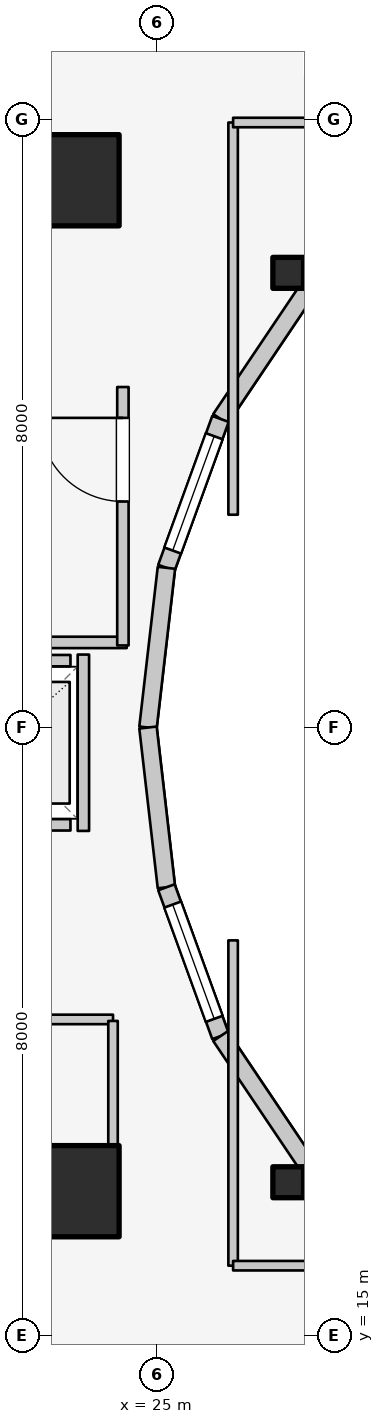
"""IFC4 building model, lengths in metres.
Left out: names, types, materials, properties, quantities, classifications, styles, units other than length and angle.
Written with IfcOpenShell. Run it as: python <this file> out.ifc"""

import sys

from ifc_helpers import new_model, si_unit, direction, frame, frame_2d, origin, origin_2d, place, context, subcontext, project, spatial, rectangle, i_section, extrude, element, fill, save


model = new_model("IFC4")
c1 = context("Model", 3, precision=1e-05, world=origin(), true_north=direction((0.0, 1.0)))
c2 = subcontext(c1, "Body", "Model", "MODEL_VIEW")
j1 = project(units=[si_unit("LENGTHUNIT", "METRE"), si_unit("PLANEANGLEUNIT", "RADIAN")], contexts=[c1])
p1 = place(None, origin())
s1 = spatial("IfcSite", under=j1, at=p1, CompositionType="ELEMENT")
p2 = place(p1, origin())
s2 = spatial("IfcBuilding", under=s1, at=p2, CompositionType="ELEMENT")
p3 = place(p2, frame((0.0, 0.0, 256.8)))
s3 = spatial("IfcBuildingStorey", under=s2, at=p3, CompositionType="ELEMENT", Elevation=256.8)
for number, where, z_axis, x_axis in (
    (1, (19.65, 16.55, 0.0), (0.0, 0.0, 1.0), (1.0, 0.0, 0.0)),
    (2, (19.65, 30.35, 0.0), (0.0, 0.0, 1.0), (1.0, 0.0, 0.0)),
):
    element("IfcWall", number, at=place(p3, frame(where, z_axis=z_axis, x_axis=x_axis)), inside=s3, PredefinedType="SHEAR", context=c2, shape_type="SweptSolid", body=[
        extrude(rectangle(XDim=4.5, YDim=0.45, at=frame_2d((2.25, 0.0))), origin(), (0.0, 0.0, 1.0), 3.6),
    ])
for number, where, z_axis, x_axis in (
    (3, (23.9, 16.9, 0.0), (0.0, 0.0, 1.0), (1.0, 0.0, 0.0)),
    (4, (23.9, 30.2, 0.0), (0.0, 0.0, 1.0), (1.0, 0.0, 0.0)),
):
    element("IfcColumn", number, at=place(p3, frame(where, z_axis=z_axis, x_axis=x_axis)), inside=s3, PredefinedType="COLUMN", context=c2, shape_type="SweptSolid", body=[
        extrude(rectangle(XDim=1.2, YDim=1.2, at=origin_2d()), origin(), (0.0, 0.0, 1.0), 3.6),
    ])
for number, where, z_axis, x_axis in (
    (5, (26.725, 28.982, 0.0), (0.0, 0.0, 1.0), (1.0, 0.0, 0.0)),
    (6, (26.725, 17.018, 0.0), (0.0, 0.0, 1.0), (1.0, 0.0, 0.0)),
):
    element("IfcColumn", number, at=place(p3, frame(where, z_axis=z_axis, x_axis=x_axis)), inside=s3, PredefinedType="COLUMN", context=c2, shape_type="SweptSolid", body=[
        extrude(i_section(OverallWidth=0.404, OverallDepth=0.407, WebThickness=0.027, FlangeThickness=0.044, FilletRadius=0.025, at=origin_2d()), origin(), (0.0, 0.0, 1.0), 3.6),
    ])
p4 = place(p3, frame((28.44, 30.032, 0.0), z_axis=(0.0, 0.0, 1.0), x_axis=(-0.752576694707, -0.658504607869, 0.0)))
e7 = element("IfcWall", 7, at=p4, inside=s3, PredefinedType="STANDARD", context=c2, shape_type="SweptSolid", body=[
    extrude(rectangle(XDim=1.959, YDim=0.23, at=frame_2d((0.98, 0.0))), origin(), (0.0, 0.0, 1.0), 1.72),
])
p5 = place(p3, frame((26.965, 28.742, 0.0), z_axis=(0.0, 0.0, 1.0), x_axis=(-0.558197800898, -0.829707909492, 0.0)))
e8 = element("IfcWall", 8, at=p5, inside=s3, PredefinedType="STANDARD", context=c2, shape_type="SweptSolid", body=[
    extrude(rectangle(XDim=2.027, YDim=0.23, at=frame_2d((1.013, 0.0))), origin(), (0.0, 0.0, 1.0), 1.72),
])
p6 = place(p3, frame((25.834, 27.06, 0.0), z_axis=(0.0, 0.0, 1.0), x_axis=(-0.341423187295, -0.93990968033, 0.0)))
e9 = element("IfcWall", 9, at=p6, inside=s3, PredefinedType="STANDARD", context=c2, shape_type="SweptSolid", body=[
    extrude(rectangle(XDim=2.084, YDim=0.23, at=frame_2d((1.042, 0.0))), origin(), (0.0, 0.0, 1.0), 3.06),
])
p7 = place(p6, frame((0.242, 0.0, 0.85)))
e10 = element("IfcOpeningElement", 10, at=p7, cuts=e9, PredefinedType="OPENING", context=c2, shape_type="SweptSolid", body=[
    extrude(rectangle(XDim=1.6, YDim=1.65, at=frame_2d((0.8, 0.825))), frame((0.0, 0.125, 0.0), z_axis=(0.0, -1.0, 0.0), x_axis=(1.0, 0.0, 0.0)), (0.0, 0.0, 1.0), 0.25),
])
for number, where, z_axis, x_axis in (
    (11, (25.123, 25.102, 0.0), (0.0, 0.0, 1.0), (-0.115, -0.993, 0.0)),
    (12, (24.88, 23.0, 0.0), (0.0, 0.0, 1.0), (0.115, -0.993, 0.0)),
):
    element("IfcWall", number, at=place(p3, frame(where, z_axis=z_axis, x_axis=x_axis)), inside=s3, PredefinedType="STANDARD", context=c2, shape_type="SweptSolid", body=[
        extrude(rectangle(XDim=2.115, YDim=0.23, at=frame_2d((1.058, 0.0))), origin(), (0.0, 0.0, 1.0), 3.06),
    ])
p8 = place(p3, frame((25.123, 20.898, 0.0), z_axis=(0.0, 0.0, 1.0), x_axis=(0.341423187295, -0.93990968033, 0.0)))
e13 = element("IfcWall", 13, at=p8, inside=s3, PredefinedType="STANDARD", context=c2, shape_type="SweptSolid", body=[
    extrude(rectangle(XDim=2.084, YDim=0.23, at=frame_2d((1.042, 0.0))), origin(), (0.0, 0.0, 1.0), 3.06),
])
p9 = place(p8, frame((0.242, 0.0, 0.85)))
e14 = element("IfcOpeningElement", 14, at=p9, cuts=e13, PredefinedType="OPENING", context=c2, shape_type="SweptSolid", body=[
    extrude(rectangle(XDim=1.6, YDim=1.65, at=frame_2d((0.8, 0.825))), frame((0.0, 0.125, 0.0), z_axis=(0.0, -1.0, 0.0), x_axis=(1.0, 0.0, 0.0)), (0.0, 0.0, 1.0), 0.25),
])
p10 = place(p3, frame((25.834, 18.94, 0.0), z_axis=(0.0, 0.0, 1.0), x_axis=(0.558197800898, -0.829707909492, 0.0)))
e15 = element("IfcWall", 15, at=p10, inside=s3, PredefinedType="STANDARD", context=c2, shape_type="SweptSolid", body=[
    extrude(rectangle(XDim=2.027, YDim=0.23, at=frame_2d((1.013, 0.0))), origin(), (0.0, 0.0, 1.0), 1.72),
])
p11 = place(p3, frame((26.965, 17.258, 0.0), z_axis=(0.0, 0.0, 1.0), x_axis=(0.752576694707, -0.658504607869, 0.0)))
e16 = element("IfcWall", 16, at=p11, inside=s3, PredefinedType="STANDARD", context=c2, shape_type="SweptSolid", body=[
    extrude(rectangle(XDim=1.959, YDim=0.23, at=frame_2d((0.98, 0.0))), origin(), (0.0, 0.0, 1.0), 1.72),
])
p12 = place(p3, frame((22.04, 21.72, 0.0), z_axis=(0.0, 0.0, 1.0), x_axis=(1.0, 0.0, 0.0)))
e17 = element("IfcWall", 17, at=p12, inside=s3, PredefinedType="SOLIDWALL", context=c2, shape_type="SweptSolid", body=[
    extrude(rectangle(XDim=1.82, YDim=0.15, at=frame_2d((0.91, 0.0))), origin(), (0.0, 0.0, 1.0), 2.62),
])
p13 = place(p12, frame((0.36, 0.0, 0.0)))
e18 = element("IfcOpeningElement", 18, at=p13, cuts=e17, PredefinedType="OPENING", context=c2, shape_type="SweptSolid", body=[
    extrude(rectangle(XDim=1.1, YDim=2.1, at=frame_2d((0.55, 1.05))), frame((0.0, 0.085, 0.0), z_axis=(0.0, -1.0, 0.0), x_axis=(1.0, 0.0, 0.0)), (0.0, 0.0, 1.0), 0.17),
])
p14 = place(p3, frame((22.04, 23.88, 0.0), z_axis=(0.0, 0.0, 1.0), x_axis=(1.0, 0.0, 0.0)))
e19 = element("IfcWall", 19, at=p14, inside=s3, PredefinedType="SOLIDWALL", context=c2, shape_type="SweptSolid", body=[
    extrude(rectangle(XDim=1.82, YDim=0.15, at=frame_2d((0.91, 0.0))), origin(), (0.0, 0.0, 1.0), 2.62),
])
p15 = place(p3, frame((24.03, 21.64, 0.0), z_axis=(0.0, 0.0, 1.0), x_axis=(0.0, 1.0, 0.0)))
e20 = element("IfcWall", 20, at=p15, inside=s3, PredefinedType="SOLIDWALL", context=c2, shape_type="SweptSolid", body=[
    extrude(rectangle(XDim=2.32, YDim=0.15, at=frame_2d((1.16, 0.0))), origin(), (0.0, 0.0, 1.0), 2.62),
])
p16 = place(p3, frame((19.52, 24.12, 0.0), z_axis=(0.0, 0.0, 1.0), x_axis=(1.0, 0.0, 0.0)))
e21 = element("IfcWall", 21, at=p16, inside=s3, PredefinedType="PARTITIONING", context=c2, shape_type="SweptSolid", body=[
    extrude(rectangle(XDim=5.08, YDim=0.15, at=frame_2d((2.54, 0.0))), origin(), (0.0, 0.0, 1.0), 2.62),
])
p17 = place(p3, frame((24.55, 24.08, 0.0), z_axis=(0.0, 0.0, 1.0), x_axis=(0.0, 1.0, 0.0)))
e22 = element("IfcWall", 22, at=p17, inside=s3, PredefinedType="PARTITIONING", context=c2, shape_type="SweptSolid", body=[
    extrude(rectangle(XDim=3.4, YDim=0.15, at=frame_2d((1.7, 0.0))), origin(), (0.0, 0.0, 1.0), 3.075),
])
p18 = place(p17, frame((1.894, 0.0, 0.0)))
e23 = element("IfcOpeningElement", 23, at=p18, cuts=e22, PredefinedType="OPENING", context=c2, shape_type="SweptSolid", body=[
    extrude(rectangle(XDim=1.1, YDim=2.1, at=frame_2d((0.55, 1.05))), frame((0.0, 0.085, 0.0), z_axis=(0.0, -1.0, 0.0), x_axis=(1.0, 0.0, 0.0)), (0.0, 0.0, 1.0), 0.17),
])
p19 = place(p3, frame((19.55, 19.16, 0.0), z_axis=(0.0, 0.0, 1.0), x_axis=(1.0, 0.0, 0.0)))
e24 = element("IfcWall", 24, at=p19, inside=s3, PredefinedType="PARTITIONING", context=c2, shape_type="SweptSolid", body=[
    extrude(rectangle(XDim=4.87, YDim=0.125, at=frame_2d((2.435, 0.0))), origin(), (0.0, 0.0, 1.0), 2.62),
])
p20 = place(p19, frame((2.272, 0.0, 0.0)))
e25 = element("IfcOpeningElement", 25, at=p20, cuts=e24, PredefinedType="OPENING", context=c2, shape_type="SweptSolid", body=[
    extrude(rectangle(XDim=0.85, YDim=2.05, at=frame_2d((0.425, 1.025))), frame((0.0, 0.073, 0.0), z_axis=(0.0, -1.0, 0.0), x_axis=(1.0, 0.0, 0.0)), (0.0, 0.0, 1.0), 0.145),
])
p21 = place(p3, frame((24.42, 17.1, 0.0), z_axis=(0.0, 0.0, 1.0), x_axis=(0.0, 1.0, 0.0)))
e26 = element("IfcWall", 26, at=p21, inside=s3, PredefinedType="PARTITIONING", context=c2, shape_type="SweptSolid", body=[
    extrude(rectangle(XDim=2.04, YDim=0.125, at=frame_2d((1.02, 0.0))), origin(), (0.0, 0.0, 1.0), 2.452),
])
p22 = place(p3, frame((28.45, 30.015, 0.0), z_axis=(0.0, 0.0, 1.0), x_axis=(-0.522763432117, 0.852477796802, 0.0)))
e27 = element("IfcWall", 27, at=p22, inside=s3, PredefinedType="PARTITIONING", context=c2, shape_type="SweptSolid", body=[
    extrude(rectangle(XDim=3.269, YDim=0.125, at=frame_2d((1.635, 0.0))), origin(), (0.0, 0.0, 1.0), 1.72),
])
p23 = place(p3, frame((28.45, 15.985, 0.0), z_axis=(0.0, 0.0, 1.0), x_axis=(-0.52592395012, -0.850531597702, 0.0)))
e28 = element("IfcWall", 28, at=p23, inside=s3, PredefinedType="PARTITIONING", context=c2, shape_type="SweptSolid", body=[
    extrude(rectangle(XDim=2.869, YDim=0.125, at=frame_2d((1.435, 0.0))), origin(), (0.0, 0.0, 1.0), 1.72),
])
p24 = place(p3, frame((26.0, 25.8, 0.0), z_axis=(0.0, 0.0, 1.0), x_axis=(0.0, 1.0, 0.0)))
e29 = element("IfcWall", 29, at=p24, inside=s3, PredefinedType="PARTITIONING", context=c2, shape_type="SweptSolid", body=[
    extrude(rectangle(XDim=5.16, YDim=0.125, at=frame_2d((2.58, 0.0))), origin(), (0.0, 0.0, 1.0), 2.452),
])
p25 = place(p3, frame((26.0, 30.96, 0.0), z_axis=(0.0, 0.0, 1.0), x_axis=(1.0, 0.0, 0.0)))
e30 = element("IfcWall", 30, at=p25, inside=s3, PredefinedType="PARTITIONING", context=c2, shape_type="SweptSolid", body=[
    extrude(rectangle(XDim=2.6, YDim=0.125, at=frame_2d((1.3, 0.0))), origin(), (0.0, 0.0, 1.0), 1.72),
])
p26 = place(p3, frame((26.0, 15.92, 0.0), z_axis=(0.0, 0.0, 1.0), x_axis=(0.0, 1.0, 0.0)))
e31 = element("IfcWall", 31, at=p26, inside=s3, PredefinedType="PARTITIONING", context=c2, shape_type="SweptSolid", body=[
    extrude(rectangle(XDim=4.28, YDim=0.125, at=frame_2d((2.14, 0.0))), origin(), (0.0, 0.0, 1.0), 1.72),
])
p27 = place(p3, frame((26.0, 15.92, 0.0), z_axis=(0.0, 0.0, 1.0), x_axis=(1.0, 0.0, 0.0)))
e32 = element("IfcWall", 32, at=p27, inside=s3, PredefinedType="PARTITIONING", context=c2, shape_type="SweptSolid", body=[
    extrude(rectangle(XDim=2.6, YDim=0.125, at=frame_2d((1.3, 0.0))), origin(), (0.0, 0.0, 1.0), 1.72),
])
p28 = place(p7, origin())
e33 = element("IfcWindow", 33, at=p28, inside=s3, PartitioningType="SINGLE_PANEL", PredefinedType="WINDOW", context=c2, shape_type="SweptSolid", body=[
    extrude(rectangle(XDim=1.6, YDim=1.65, at=frame_2d((0.8, 0.825))), frame((0.0, 0.03, 0.0), z_axis=(0.0, -1.0, 0.0), x_axis=(1.0, 0.0, 0.0)), (0.0, 0.0, 1.0), 0.06),
])
fill(e10, e33)
p29 = place(p9, origin())
e34 = element("IfcWindow", 34, at=p29, inside=s3, PartitioningType="SINGLE_PANEL", PredefinedType="WINDOW", context=c2, shape_type="SweptSolid", body=[
    extrude(rectangle(XDim=1.6, YDim=1.65, at=frame_2d((0.8, 0.825))), frame((0.0, 0.03, 0.0), z_axis=(0.0, -1.0, 0.0), x_axis=(1.0, 0.0, 0.0)), (0.0, 0.0, 1.0), 0.06),
])
fill(e14, e34)
p30 = place(p18, origin())
e35 = element("IfcDoor", 35, at=p30, inside=s3, OperationType="SINGLE_SWING_RIGHT", PredefinedType="DOOR", context=c2, shape_type="SweptSolid", body=[
    extrude(rectangle(XDim=1.1, YDim=2.1, at=frame_2d((0.55, 1.05))), frame((0.0, 0.025, 0.0), z_axis=(0.0, -1.0, 0.0), x_axis=(1.0, 0.0, 0.0)), (0.0, 0.0, 1.0), 0.05),
])
fill(e23, e35)
save(model, sys.argv[1])
